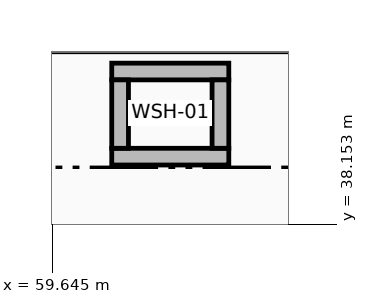
"""IFC4 building model, lengths in metres.
Left out: names, types, materials, properties, quantities, classifications, styles, units other than length and angle.
Written with IfcOpenShell. Run it as: python <this file> out.ifc"""

import sys

from ifc_helpers import new_model, si_unit, direction, frame, frame_2d, origin, place, context, subcontext, project, spatial, rectangle, extrude, element, save


model = new_model("IFC4")
c1 = context("Model", 3, precision=1e-05, world=origin(), true_north=direction((0.0, 1.0)))
c2 = subcontext(c1, "Body", "Model", "MODEL_VIEW")
j1 = project(units=[si_unit("LENGTHUNIT", "METRE"), si_unit("PLANEANGLEUNIT", "RADIAN")], contexts=[c1])
p1 = place(None, origin())
s1 = spatial("IfcSite", under=j1, at=p1, CompositionType="ELEMENT")
p2 = place(p1, origin())
s2 = spatial("IfcBuilding", under=s1, at=p2, CompositionType="ELEMENT")
p3 = place(p2, frame((0.0, 0.0, 4.5)))
s3 = spatial("IfcBuildingStorey", under=s2, at=p3, CompositionType="ELEMENT", Elevation=4.5)
for number, where, z_axis, x_axis in (
    (1, (60.43, 39.04, 0.0), (0.0, 0.0, 1.0), (1.0, 0.0, 0.0)),
    (2, (60.43, 40.16, 0.0), (0.0, 0.0, 1.0), (1.0, 0.0, 0.0)),
):
    element("IfcWall", number, at=place(p3, frame(where, z_axis=z_axis, x_axis=x_axis)), inside=s3, PredefinedType="STANDARD", context=c2, shape_type="SweptSolid", body=[
        extrude(rectangle(XDim=1.54, YDim=0.22, at=frame_2d((0.77, 0.0))), origin(), (0.0, 0.0, 1.0), 3.26),
    ])
for number, where, z_axis, x_axis in (
    (3, (60.54, 39.15, 0.0), (0.0, 0.0, 1.0), (0.0, 1.0, 0.0)),
    (4, (61.86, 39.15, 0.0), (0.0, 0.0, 1.0), (0.0, 1.0, 0.0)),
):
    element("IfcWall", number, at=place(p3, frame(where, z_axis=z_axis, x_axis=x_axis)), inside=s3, PredefinedType="STANDARD", context=c2, shape_type="SweptSolid", body=[
        extrude(rectangle(XDim=0.9, YDim=0.22, at=frame_2d((0.45, 0.0))), origin(), (0.0, 0.0, 1.0), 3.26),
    ])
save(model, sys.argv[1])
